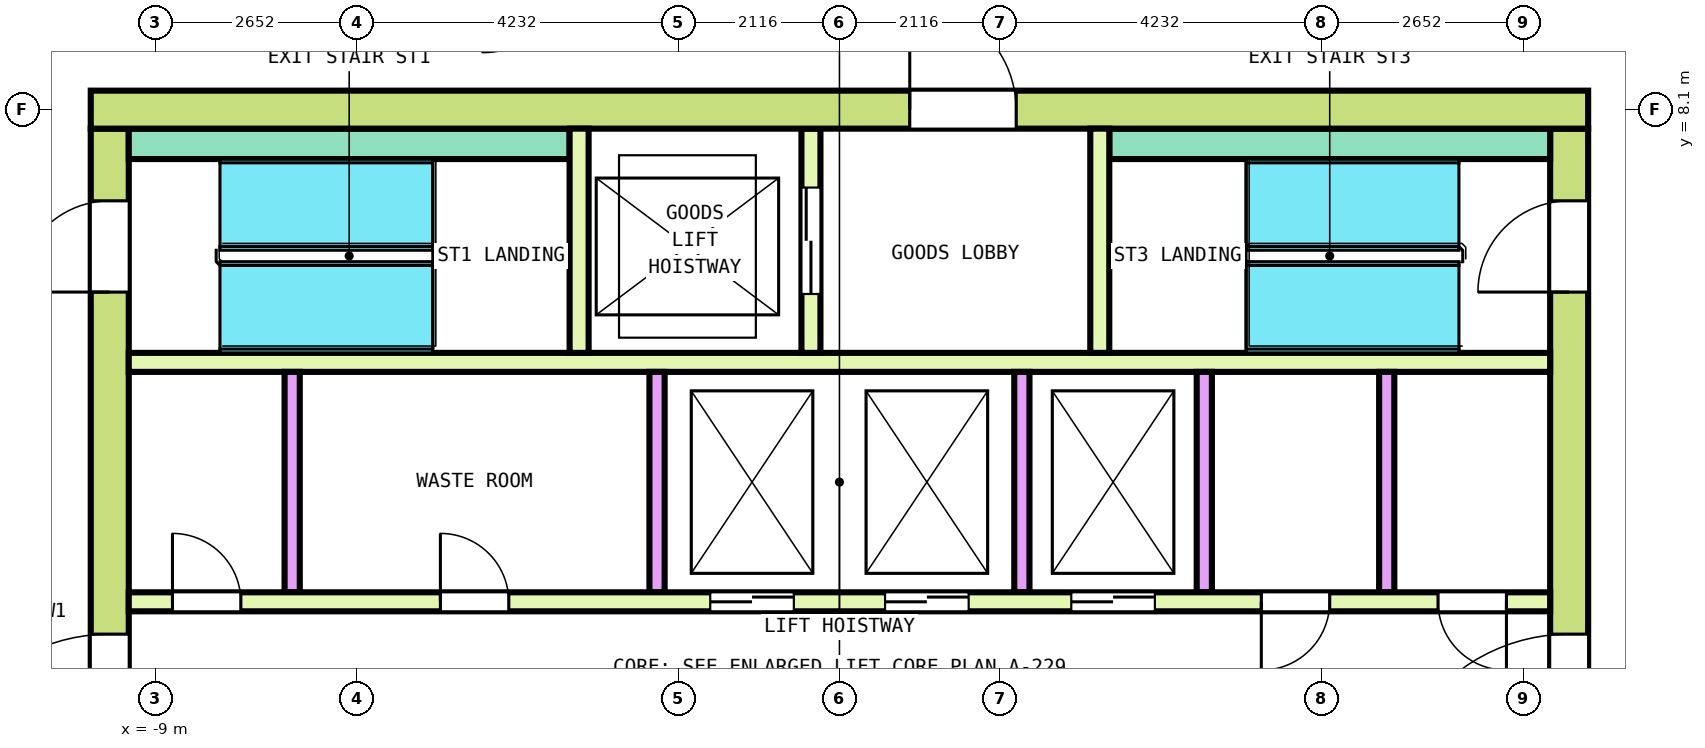
"""IFC4 building model, lengths in metres.
Left out: names, types, materials, properties, quantities, classifications, styles, units other than length and angle.
Written with IfcOpenShell. Run it as: python <this file> out.ifc"""

import sys

from ifc_helpers import new_model, si_unit, direction, frame, frame_2d, origin, place, context, subcontext, project, spatial, rectangle, extrude, element, fill, save


model = new_model("IFC4")
c1 = context("Model", 3, precision=1e-05, world=origin(), true_north=direction((0.0, 1.0)))
c2 = subcontext(c1, "Body", "Model", "MODEL_VIEW")
j1 = project(units=[si_unit("LENGTHUNIT", "METRE"), si_unit("PLANEANGLEUNIT", "RADIAN")], contexts=[c1])
p1 = place(None, origin())
s1 = spatial("IfcSite", under=j1, at=p1, CompositionType="ELEMENT")
p2 = place(p1, origin())
s2 = spatial("IfcBuilding", under=s1, at=p2, CompositionType="ELEMENT")
p3 = place(p2, frame((0.0, 0.0, 332.6)))
s3 = spatial("IfcBuildingStorey", under=s2, at=p3, CompositionType="ELEMENT", Elevation=332.6)
p4 = place(p3, frame((-9.85, 8.1, 0.0), z_axis=(0.0, 0.0, 1.0), x_axis=(1.0, 0.0, 0.0)))
e1 = element("IfcWall", 1, at=p4, inside=s3, PredefinedType="SHEAR", context=c2, shape_type="SweptSolid", body=[
    extrude(rectangle(XDim=19.7, YDim=0.5, at=frame_2d((9.85, 0.0))), origin(), (0.0, 0.0, 1.0), 3.7),
])
p5 = place(p4, frame((10.775, 0.0, 0.0)))
e2 = element("IfcOpeningElement", 2, at=p5, cuts=e1, PredefinedType="OPENING", context=c2, shape_type="SweptSolid", body=[
    extrude(rectangle(XDim=1.4, YDim=2.1, at=frame_2d((0.7, 1.05))), frame((0.0, 0.26, 0.0), z_axis=(0.0, -1.0, 0.0), x_axis=(1.0, 0.0, 0.0)), (0.0, 0.0, 1.0), 0.52),
])
p6 = place(p3, frame((-9.6, -7.85, 0.0), z_axis=(0.0, 0.0, 1.0), x_axis=(0.0, 1.0, 0.0)))
e3 = element("IfcWall", 3, at=p6, inside=s3, PredefinedType="SHEAR", context=c2, shape_type="SweptSolid", body=[
    extrude(rectangle(XDim=15.7, YDim=0.5, at=frame_2d((7.85, 0.0))), origin(), (0.0, 0.0, 1.0), 3.7),
])
p7 = place(p6, frame((6.65, 0.0, 0.0)))
e4 = element("IfcOpeningElement", 4, at=p7, cuts=e3, PredefinedType="OPENING", context=c2, shape_type="SweptSolid", body=[
    extrude(rectangle(XDim=2.4, YDim=2.1, at=frame_2d((1.2, 1.05))), frame((0.0, 0.26, 0.0), z_axis=(0.0, -1.0, 0.0), x_axis=(1.0, 0.0, 0.0)), (0.0, 0.0, 1.0), 0.52),
])
p8 = place(p6, frame((13.55, 0.0, 0.0)))
e5 = element("IfcOpeningElement", 5, at=p8, cuts=e3, PredefinedType="OPENING", context=c2, shape_type="SweptSolid", body=[
    extrude(rectangle(XDim=1.2, YDim=2.1, at=frame_2d((0.6, 1.05))), frame((0.0, 0.26, 0.0), z_axis=(0.0, -1.0, 0.0), x_axis=(1.0, 0.0, 0.0)), (0.0, 0.0, 1.0), 0.52),
])
p9 = place(p6, frame((0.95, 0.0, 0.0)))
e6 = element("IfcOpeningElement", 6, at=p9, cuts=e3, PredefinedType="OPENING", context=c2, shape_type="SweptSolid", body=[
    extrude(rectangle(XDim=1.2, YDim=2.1, at=frame_2d((0.6, 1.05))), frame((0.0, 0.26, 0.0), z_axis=(0.0, -1.0, 0.0), x_axis=(1.0, 0.0, 0.0)), (0.0, 0.0, 1.0), 0.52),
])
p10 = place(p3, frame((9.6, -7.85, 0.0), z_axis=(0.0, 0.0, 1.0), x_axis=(0.0, 1.0, 0.0)))
e7 = element("IfcWall", 7, at=p10, inside=s3, PredefinedType="SHEAR", context=c2, shape_type="SweptSolid", body=[
    extrude(rectangle(XDim=15.7, YDim=0.5, at=frame_2d((7.85, 0.0))), origin(), (0.0, 0.0, 1.0), 3.7),
])
p11 = place(p10, frame((6.65, 0.0, 0.0)))
e8 = element("IfcOpeningElement", 8, at=p11, cuts=e7, PredefinedType="OPENING", context=c2, shape_type="SweptSolid", body=[
    extrude(rectangle(XDim=2.4, YDim=2.1, at=frame_2d((1.2, 1.05))), frame((0.0, 0.26, 0.0), z_axis=(0.0, -1.0, 0.0), x_axis=(1.0, 0.0, 0.0)), (0.0, 0.0, 1.0), 0.52),
])
p12 = place(p10, frame((13.55, 0.0, 0.0)))
e9 = element("IfcOpeningElement", 9, at=p12, cuts=e7, PredefinedType="OPENING", context=c2, shape_type="SweptSolid", body=[
    extrude(rectangle(XDim=1.2, YDim=2.1, at=frame_2d((0.6, 1.05))), frame((0.0, 0.26, 0.0), z_axis=(0.0, -1.0, 0.0), x_axis=(1.0, 0.0, 0.0)), (0.0, 0.0, 1.0), 0.52),
])
p13 = place(p10, frame((1.05, 0.0, 0.0)))
e10 = element("IfcOpeningElement", 10, at=p13, cuts=e7, PredefinedType="OPENING", context=c2, shape_type="SweptSolid", body=[
    extrude(rectangle(XDim=1.0, YDim=2.1, at=frame_2d((0.5, 1.05))), frame((0.0, 0.26, 0.0), z_axis=(0.0, -1.0, 0.0), x_axis=(1.0, 0.0, 0.0)), (0.0, 0.0, 1.0), 0.52),
])
p14 = place(p3, frame((-9.35, 1.625, 0.0), z_axis=(0.0, 0.0, 1.0), x_axis=(1.0, 0.0, 0.0)))
e11 = element("IfcWall", 11, at=p14, inside=s3, PredefinedType="SOLIDWALL", context=c2, shape_type="SweptSolid", body=[
    extrude(rectangle(XDim=18.7, YDim=0.25, at=frame_2d((9.35, 0.0))), origin(), (0.0, 0.0, 1.0), 3.7),
])
p15 = place(p14, frame((7.65, 0.0, 0.0)))
e12 = element("IfcOpeningElement", 12, at=p15, cuts=e11, PredefinedType="OPENING", context=c2, shape_type="SweptSolid", body=[
    extrude(rectangle(XDim=1.1, YDim=2.1, at=frame_2d((0.55, 1.05))), frame((0.0, 0.135, 0.0), z_axis=(0.0, -1.0, 0.0), x_axis=(1.0, 0.0, 0.0)), (0.0, 0.0, 1.0), 0.27),
])
p16 = place(p14, frame((9.95, 0.0, 0.0)))
e13 = element("IfcOpeningElement", 13, at=p16, cuts=e11, PredefinedType="OPENING", context=c2, shape_type="SweptSolid", body=[
    extrude(rectangle(XDim=1.1, YDim=2.1, at=frame_2d((0.55, 1.05))), frame((0.0, 0.135, 0.0), z_axis=(0.0, -1.0, 0.0), x_axis=(1.0, 0.0, 0.0)), (0.0, 0.0, 1.0), 0.27),
])
p17 = place(p14, frame((12.4, 0.0, 0.0)))
e14 = element("IfcOpeningElement", 14, at=p17, cuts=e11, PredefinedType="OPENING", context=c2, shape_type="SweptSolid", body=[
    extrude(rectangle(XDim=1.1, YDim=2.1, at=frame_2d((0.55, 1.05))), frame((0.0, 0.135, 0.0), z_axis=(0.0, -1.0, 0.0), x_axis=(1.0, 0.0, 0.0)), (0.0, 0.0, 1.0), 0.27),
])
p18 = place(p14, frame((0.575, 0.0, 0.0)))
e15 = element("IfcOpeningElement", 15, at=p18, cuts=e11, PredefinedType="OPENING", context=c2, shape_type="SweptSolid", body=[
    extrude(rectangle(XDim=0.9, YDim=2.1, at=frame_2d((0.45, 1.05))), frame((0.0, 0.135, 0.0), z_axis=(0.0, -1.0, 0.0), x_axis=(1.0, 0.0, 0.0)), (0.0, 0.0, 1.0), 0.27),
])
p19 = place(p14, frame((4.1, 0.0, 0.0)))
e16 = element("IfcOpeningElement", 16, at=p19, cuts=e11, PredefinedType="OPENING", context=c2, shape_type="SweptSolid", body=[
    extrude(rectangle(XDim=0.9, YDim=2.1, at=frame_2d((0.45, 1.05))), frame((0.0, 0.135, 0.0), z_axis=(0.0, -1.0, 0.0), x_axis=(1.0, 0.0, 0.0)), (0.0, 0.0, 1.0), 0.27),
])
p20 = place(p14, frame((14.9, 0.0, 0.0)))
e17 = element("IfcOpeningElement", 17, at=p20, cuts=e11, PredefinedType="OPENING", context=c2, shape_type="SweptSolid", body=[
    extrude(rectangle(XDim=0.9, YDim=2.1, at=frame_2d((0.45, 1.05))), frame((0.0, 0.135, 0.0), z_axis=(0.0, -1.0, 0.0), x_axis=(1.0, 0.0, 0.0)), (0.0, 0.0, 1.0), 0.27),
])
p21 = place(p14, frame((17.225, 0.0, 0.0)))
e18 = element("IfcOpeningElement", 18, at=p21, cuts=e11, PredefinedType="OPENING", context=c2, shape_type="SweptSolid", body=[
    extrude(rectangle(XDim=0.9, YDim=2.1, at=frame_2d((0.45, 1.05))), frame((0.0, 0.135, 0.0), z_axis=(0.0, -1.0, 0.0), x_axis=(1.0, 0.0, 0.0)), (0.0, 0.0, 1.0), 0.27),
])
p22 = place(p3, frame((-9.35, 4.775, 0.0), z_axis=(0.0, 0.0, 1.0), x_axis=(1.0, 0.0, 0.0)))
e19 = element("IfcWall", 19, at=p22, inside=s3, PredefinedType="SOLIDWALL", context=c2, shape_type="SweptSolid", body=[
    extrude(rectangle(XDim=18.7, YDim=0.25, at=frame_2d((9.35, 0.0))), origin(), (0.0, 0.0, 1.0), 3.7),
])
for number, where, z_axis, x_axis in (
    (20, (-7.2, 1.75, 0.0), (0.0, 0.0, 1.0), (0.0, 1.0, 0.0)),
    (21, (-2.4, 1.75, 0.0), (0.0, 0.0, 1.0), (0.0, 1.0, 0.0)),
    (22, (2.4, 1.75, 0.0), (0.0, 0.0, 1.0), (0.0, 1.0, 0.0)),
    (23, (4.8, 1.75, 0.0), (0.0, 0.0, 1.0), (0.0, 1.0, 0.0)),
    (24, (7.2, 1.75, 0.0), (0.0, 0.0, 1.0), (0.0, 1.0, 0.0)),
):
    element("IfcWall", number, at=place(p3, frame(where, z_axis=z_axis, x_axis=x_axis)), inside=s3, PredefinedType="SOLIDWALL", context=c2, shape_type="SweptSolid", body=[
        extrude(rectangle(XDim=2.9, YDim=0.2, at=frame_2d((1.45, 0.0))), origin(), (0.0, 0.0, 1.0), 3.7),
    ])
for number, where, z_axis, x_axis in (
    (25, (-9.35, 7.65, 0.0), (0.0, 0.0, 1.0), (1.0, 0.0, 0.0)),
    (26, (3.55, 7.65, 0.0), (0.0, 0.0, 1.0), (1.0, 0.0, 0.0)),
):
    element("IfcWall", number, at=place(p3, frame(where, z_axis=z_axis, x_axis=x_axis)), inside=s3, PredefinedType="SOLIDWALL", context=c2, shape_type="SweptSolid", body=[
        extrude(rectangle(XDim=5.8, YDim=0.4, at=frame_2d((2.9, 0.0))), origin(), (0.0, 0.0, 1.0), 3.7),
    ])
p23 = place(p3, frame((-3.425, 4.9, 0.0), z_axis=(0.0, 0.0, 1.0), x_axis=(0.0, 1.0, 0.0)))
e27 = element("IfcWall", 27, at=p23, inside=s3, PredefinedType="SOLIDWALL", context=c2, shape_type="SweptSolid", body=[
    extrude(rectangle(XDim=2.95, YDim=0.25, at=frame_2d((1.475, 0.0))), origin(), (0.0, 0.0, 1.0), 3.7),
])
p24 = place(p3, frame((-0.375, 4.9, 0.0), z_axis=(0.0, 0.0, 1.0), x_axis=(0.0, 1.0, 0.0)))
e28 = element("IfcWall", 28, at=p24, inside=s3, PredefinedType="SOLIDWALL", context=c2, shape_type="SweptSolid", body=[
    extrude(rectangle(XDim=2.95, YDim=0.25, at=frame_2d((1.475, 0.0))), origin(), (0.0, 0.0, 1.0), 3.7),
])
p25 = place(p24, frame((0.775, 0.0, 0.0)))
e29 = element("IfcOpeningElement", 29, at=p25, cuts=e28, PredefinedType="OPENING", context=c2, shape_type="SweptSolid", body=[
    extrude(rectangle(XDim=1.4, YDim=2.1, at=frame_2d((0.7, 1.05))), frame((0.0, 0.135, 0.0), z_axis=(0.0, -1.0, 0.0), x_axis=(1.0, 0.0, 0.0)), (0.0, 0.0, 1.0), 0.27),
])
p26 = place(p3, frame((3.425, 4.9, 0.0), z_axis=(0.0, 0.0, 1.0), x_axis=(0.0, 1.0, 0.0)))
e30 = element("IfcWall", 30, at=p26, inside=s3, PredefinedType="SOLIDWALL", context=c2, shape_type="SweptSolid", body=[
    extrude(rectangle(XDim=2.95, YDim=0.25, at=frame_2d((1.475, 0.0))), origin(), (0.0, 0.0, 1.0), 3.7),
])
p27 = place(p15, origin())
e31 = element("IfcDoor", 31, at=p27, inside=s3, OperationType="DOUBLE_DOOR_SLIDING", PredefinedType="DOOR", context=c2, shape_type="SweptSolid", body=[
    extrude(rectangle(XDim=1.1, YDim=2.1, at=frame_2d((0.55, 1.05))), frame((0.0, 0.075, 0.0), z_axis=(0.0, -1.0, 0.0), x_axis=(1.0, 0.0, 0.0)), (0.0, 0.0, 1.0), 0.15),
])
fill(e12, e31)
p28 = place(p16, origin())
e32 = element("IfcDoor", 32, at=p28, inside=s3, OperationType="DOUBLE_DOOR_SLIDING", PredefinedType="DOOR", context=c2, shape_type="SweptSolid", body=[
    extrude(rectangle(XDim=1.1, YDim=2.1, at=frame_2d((0.55, 1.05))), frame((0.0, 0.075, 0.0), z_axis=(0.0, -1.0, 0.0), x_axis=(1.0, 0.0, 0.0)), (0.0, 0.0, 1.0), 0.15),
])
fill(e13, e32)
p29 = place(p17, origin())
e33 = element("IfcDoor", 33, at=p29, inside=s3, OperationType="DOUBLE_DOOR_SLIDING", PredefinedType="DOOR", context=c2, shape_type="SweptSolid", body=[
    extrude(rectangle(XDim=1.1, YDim=2.1, at=frame_2d((0.55, 1.05))), frame((0.0, 0.075, 0.0), z_axis=(0.0, -1.0, 0.0), x_axis=(1.0, 0.0, 0.0)), (0.0, 0.0, 1.0), 0.15),
])
fill(e14, e33)
p30 = place(p25, origin())
e34 = element("IfcDoor", 34, at=p30, inside=s3, OperationType="DOUBLE_DOOR_SLIDING", PredefinedType="DOOR", context=c2, shape_type="SweptSolid", body=[
    extrude(rectangle(XDim=1.4, YDim=2.1, at=frame_2d((0.7, 1.05))), frame((0.0, 0.075, 0.0), z_axis=(0.0, -1.0, 0.0), x_axis=(1.0, 0.0, 0.0)), (0.0, 0.0, 1.0), 0.15),
])
fill(e29, e34)
p31 = place(p7, origin())
e35 = element("IfcDoor", 35, at=p31, inside=s3, OperationType="DOUBLE_DOOR_SINGLE_SWING", PredefinedType="DOOR", context=c2, shape_type="SweptSolid", body=[
    extrude(rectangle(XDim=2.4, YDim=2.1, at=frame_2d((1.2, 1.05))), frame((0.0, 0.2, 0.0), z_axis=(0.0, -1.0, 0.0), x_axis=(1.0, 0.0, 0.0)), (0.0, 0.0, 1.0), 0.4),
])
fill(e4, e35)
p32 = place(p11, origin())
e36 = element("IfcDoor", 36, at=p32, inside=s3, OperationType="DOUBLE_DOOR_SINGLE_SWING", PredefinedType="DOOR", context=c2, shape_type="SweptSolid", body=[
    extrude(rectangle(XDim=2.4, YDim=2.1, at=frame_2d((1.2, 1.05))), frame((0.0, 0.2, 0.0), z_axis=(0.0, -1.0, 0.0), x_axis=(1.0, 0.0, 0.0)), (0.0, 0.0, 1.0), 0.4),
])
fill(e8, e36)
p33 = place(p8, origin())
e37 = element("IfcDoor", 37, at=p33, inside=s3, OperationType="SINGLE_SWING_RIGHT", PredefinedType="DOOR", context=c2, shape_type="SweptSolid", body=[
    extrude(rectangle(XDim=1.2, YDim=2.1, at=frame_2d((0.6, 1.05))), frame((0.0, 0.2, 0.0), z_axis=(0.0, -1.0, 0.0), x_axis=(1.0, 0.0, 0.0)), (0.0, 0.0, 1.0), 0.4),
])
fill(e5, e37)
p34 = place(p12, origin())
e38 = element("IfcDoor", 38, at=p34, inside=s3, OperationType="SINGLE_SWING_RIGHT", PredefinedType="DOOR", context=c2, shape_type="SweptSolid", body=[
    extrude(rectangle(XDim=1.2, YDim=2.1, at=frame_2d((0.6, 1.05))), frame((0.0, 0.2, 0.0), z_axis=(0.0, -1.0, 0.0), x_axis=(1.0, 0.0, 0.0)), (0.0, 0.0, 1.0), 0.4),
])
fill(e9, e38)
p35 = place(p5, origin())
e39 = element("IfcDoor", 39, at=p35, inside=s3, OperationType="DOUBLE_DOOR_SINGLE_SWING", PredefinedType="DOOR", context=c2, shape_type="SweptSolid", body=[
    extrude(rectangle(XDim=1.4, YDim=2.1, at=frame_2d((0.7, 1.05))), frame((0.0, 0.2, 0.0), z_axis=(0.0, -1.0, 0.0), x_axis=(1.0, 0.0, 0.0)), (0.0, 0.0, 1.0), 0.4),
])
fill(e2, e39)
p36 = place(p18, origin())
e40 = element("IfcDoor", 40, at=p36, inside=s3, OperationType="SINGLE_SWING_RIGHT", PredefinedType="DOOR", context=c2, shape_type="SweptSolid", body=[
    extrude(rectangle(XDim=0.9, YDim=2.1, at=frame_2d((0.45, 1.05))), frame((0.0, 0.075, 0.0), z_axis=(0.0, -1.0, 0.0), x_axis=(1.0, 0.0, 0.0)), (0.0, 0.0, 1.0), 0.15),
])
fill(e15, e40)
p37 = place(p19, origin())
e41 = element("IfcDoor", 41, at=p37, inside=s3, OperationType="SINGLE_SWING_LEFT", PredefinedType="DOOR", context=c2, shape_type="SweptSolid", body=[
    extrude(rectangle(XDim=0.9, YDim=2.1, at=frame_2d((0.45, 1.05))), frame((0.0, 0.075, 0.0), z_axis=(0.0, -1.0, 0.0), x_axis=(1.0, 0.0, 0.0)), (0.0, 0.0, 1.0), 0.15),
])
fill(e16, e41)
p38 = place(p20, origin())
e42 = element("IfcDoor", 42, at=p38, inside=s3, OperationType="SINGLE_SWING_RIGHT", PredefinedType="DOOR", context=c2, shape_type="SweptSolid", body=[
    extrude(rectangle(XDim=0.9, YDim=2.1, at=frame_2d((0.45, 1.05))), frame((0.0, 0.075, 0.0), z_axis=(0.0, -1.0, 0.0), x_axis=(1.0, 0.0, 0.0)), (0.0, 0.0, 1.0), 0.15),
])
fill(e17, e42)
p39 = place(p21, origin())
e43 = element("IfcDoor", 43, at=p39, inside=s3, OperationType="SINGLE_SWING_LEFT", PredefinedType="DOOR", context=c2, shape_type="SweptSolid", body=[
    extrude(rectangle(XDim=0.9, YDim=2.1, at=frame_2d((0.45, 1.05))), frame((0.0, 0.075, 0.0), z_axis=(0.0, -1.0, 0.0), x_axis=(1.0, 0.0, 0.0)), (0.0, 0.0, 1.0), 0.15),
])
fill(e18, e43)
save(model, sys.argv[1])
